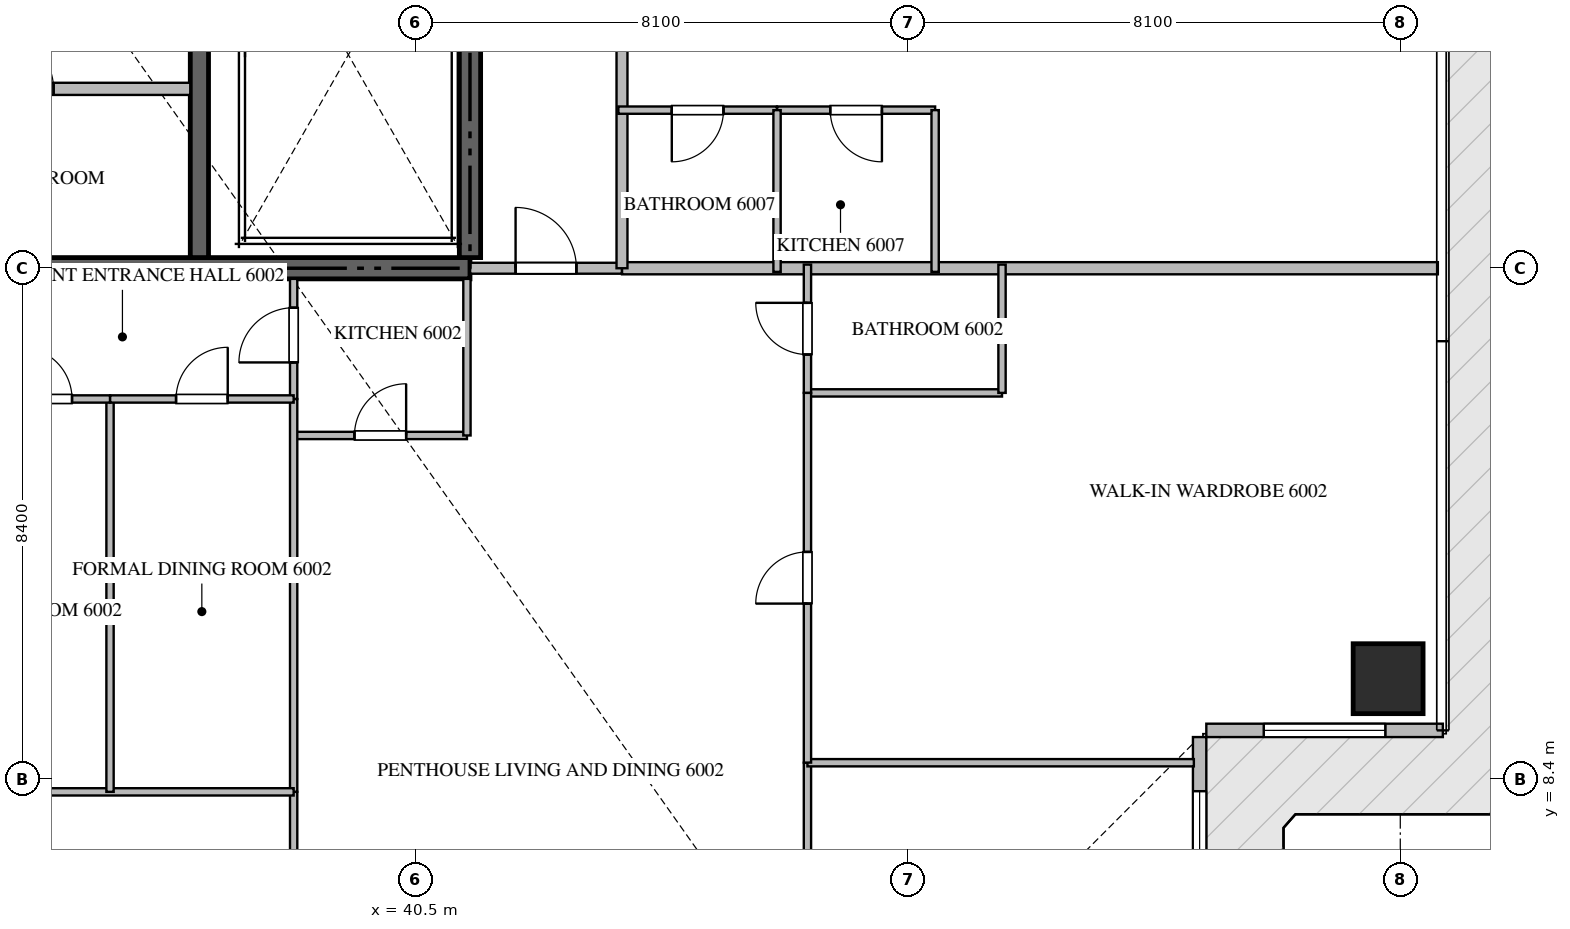
"""IFC4 building model, lengths in metres.
Left out: names, types, materials, properties, quantities, classifications, styles, units other than length and angle.
Written with IfcOpenShell. Run it as: python <this file> out.ifc"""

import sys

from ifc_helpers import new_model, si_unit, direction, frame, frame_2d, origin, origin_2d, place, context, subcontext, project, spatial, rectangle, extrude, source, transform, mapped, element, fill, save


model = new_model("IFC4")
c1 = context("Model", 3, precision=1e-05, world=origin(), true_north=direction((0.0, 1.0)))
c2 = subcontext(c1, "Body", "Model", "MODEL_VIEW")
j1 = project(units=[si_unit("LENGTHUNIT", "METRE"), si_unit("PLANEANGLEUNIT", "RADIAN")], contexts=[c1])
p1 = place(None, origin())
s1 = spatial("IfcSite", under=j1, at=p1, CompositionType="ELEMENT")
p2 = place(p1, origin())
s2 = spatial("IfcBuilding", under=s1, at=p2, CompositionType="ELEMENT")
p3 = place(p2, frame((0.0, 0.0, 241.25)))
s3 = spatial("IfcBuildingStorey", under=s2, at=p3, CompositionType="ELEMENT", Elevation=241.25)
p4 = place(p3, frame((23.4, 16.8, -0.26), z_axis=(0.0, 0.0, 1.0), x_axis=(1.0, 0.0, 0.0)))
e1 = element("IfcWall", 1, at=p4, inside=s3, PredefinedType="SHEAR", context=c2, shape_type="SweptSolid", body=[
    extrude(rectangle(XDim=18.0, YDim=0.35, at=frame_2d((9.0, 0.0))), origin(), (0.0, 0.0, 1.0), 3.848),
])
p5 = place(p3, frame((41.4, 16.975, -0.26), z_axis=(0.0, 0.0, 1.0), x_axis=(0.0, 1.0, 0.0)))
e2 = element("IfcWall", 2, at=p5, inside=s3, PredefinedType="SHEAR", context=c2, shape_type="SweptSolid", body=[
    extrude(rectangle(XDim=8.375, YDim=0.35, at=frame_2d((4.188, 0.0))), origin(), (0.0, 0.0, 1.0), 3.848),
])
p6 = place(p3, frame((36.95, 16.975, -0.26), z_axis=(0.0, 0.0, 1.0), x_axis=(0.0, 1.0, 0.0)))
e3 = element("IfcWall", 3, at=p6, inside=s3, PredefinedType="SHEAR", context=c2, shape_type="SweptSolid", body=[
    extrude(rectangle(XDim=8.375, YDim=0.3, at=frame_2d((4.188, 0.0))), origin(), (0.0, 0.0, 1.0), 3.848),
])
m1 = source(origin(), c2, "Body", "SweptSolid", [
    extrude(rectangle(XDim=1.15, YDim=1.15, at=origin_2d()), origin(), (0.0, 0.0, 1.0), 3.85),
])
p7 = place(p3, frame((56.5, 10.05, -0.26), z_axis=(0.0, 0.0, 1.0), x_axis=(1.0, 0.0, 0.0)))
e4 = element("IfcColumn", 4, at=p7, inside=s3, PredefinedType="COLUMN", context=c2, shape_type="MappedRepresentation", body=[
    mapped(m1, transform((0.0, 0.0, 0.0), scale=1.0)),
])
p8 = place(p3, frame((53.4, 5.31, 0.0), z_axis=(0.0, 0.0, 1.0), x_axis=(0.0, 1.0, 0.0)))
e5 = element("IfcWall", 5, at=p8, inside=s3, PredefinedType="ELEMENTEDWALL", context=c2, shape_type="SweptSolid", body=[
    extrude(rectangle(XDim=3.78, YDim=0.22, at=frame_2d((1.89, 0.0))), origin(), (0.0, 0.0, 1.0), 3.575),
])
p9 = place(p8, frame((0.89, 0.0, 0.65)))
e6 = element("IfcOpeningElement", 6, at=p9, cuts=e5, PredefinedType="OPENING", context=c2, shape_type="SweptSolid", body=[
    extrude(rectangle(XDim=2.0, YDim=2.2, at=frame_2d((1.0, 1.1))), frame((0.0, 0.12, 0.0), z_axis=(0.0, -1.0, 0.0), x_axis=(1.0, 0.0, 0.0)), (0.0, 0.0, 1.0), 0.24),
])
p10 = place(p3, frame((53.51, 9.2, 0.0), z_axis=(0.0, 0.0, 1.0), x_axis=(1.0, 0.0, 0.0)))
e7 = element("IfcWall", 7, at=p10, inside=s3, PredefinedType="ELEMENTEDWALL", context=c2, shape_type="SweptSolid", body=[
    extrude(rectangle(XDim=3.89, YDim=0.22, at=frame_2d((1.945, 0.0))), origin(), (0.0, 0.0, 1.0), 3.575),
])
p11 = place(p10, frame((0.945, 0.0, 0.65)))
e8 = element("IfcOpeningElement", 8, at=p11, cuts=e7, PredefinedType="OPENING", context=c2, shape_type="SweptSolid", body=[
    extrude(rectangle(XDim=2.0, YDim=2.2, at=frame_2d((1.0, 1.1))), frame((0.0, 0.12, 0.0), z_axis=(0.0, -1.0, 0.0), x_axis=(1.0, 0.0, 0.0)), (0.0, 0.0, 1.0), 0.24),
])
p12 = place(p3, frame((31.402, 19.75, 0.0), z_axis=(0.0, 0.0, 1.0), x_axis=(1.0, 0.0, 0.0)))
e9 = element("IfcWall", 9, at=p12, inside=s3, PredefinedType="STANDARD", context=c2, shape_type="SweptSolid", body=[
    extrude(rectangle(XDim=5.398, YDim=0.2, at=frame_2d((2.699, 0.0))), origin(), (0.0, 0.0, 1.0), 3.59),
])
p13 = place(p12, frame((2.249, 0.0, 0.0)))
e10 = element("IfcOpeningElement", 10, at=p13, cuts=e9, PredefinedType="OPENING", context=c2, shape_type="SweptSolid", body=[
    extrude(rectangle(XDim=0.9, YDim=2.1, at=frame_2d((0.45, 1.05))), frame((0.0, 0.11, 0.0), z_axis=(0.0, -1.0, 0.0), x_axis=(1.0, 0.0, 0.0)), (0.0, 0.0, 1.0), 0.22),
])
p14 = place(p3, frame((43.9, 16.8, 0.0), z_axis=(0.0, 0.0, 1.0), x_axis=(1.0, 0.0, 0.0)))
e11 = element("IfcWall", 11, at=p14, inside=s3, PredefinedType="PARTITIONING", context=c2, shape_type="SweptSolid", body=[
    extrude(rectangle(XDim=13.418, YDim=0.2, at=frame_2d((6.709, 0.0))), origin(), (0.0, 0.0, 1.0), 3.59),
])
p15 = place(p3, frame((41.402, 16.8, 0.0), z_axis=(0.0, 0.0, 1.0), x_axis=(1.0, 0.0, 0.0)))
e12 = element("IfcWall", 12, at=p15, inside=s3, PredefinedType="PARTITIONING", context=c2, shape_type="SweptSolid", body=[
    extrude(rectangle(XDim=2.496, YDim=0.18, at=frame_2d((1.248, 0.0))), origin(), (0.0, 0.0, 1.0), 3.59),
])
p16 = place(p15, frame((0.748, 0.0, 0.0)))
e13 = element("IfcOpeningElement", 13, at=p16, cuts=e12, PredefinedType="OPENING", context=c2, shape_type="SweptSolid", body=[
    extrude(rectangle(XDim=1.0, YDim=2.15, at=frame_2d((0.5, 1.075))), frame((0.0, 0.1, 0.0), z_axis=(0.0, -1.0, 0.0), x_axis=(1.0, 0.0, 0.0)), (0.0, 0.0, 1.0), 0.2),
])
p17 = place(p3, frame((43.9, 16.8, 0.0), z_axis=(0.0, 0.0, 1.0), x_axis=(0.0, 1.0, 0.0)))
e14 = element("IfcWall", 14, at=p17, inside=s3, PredefinedType="PARTITIONING", context=c2, shape_type="SweptSolid", body=[
    extrude(rectangle(XDim=16.8, YDim=0.18, at=frame_2d((8.4, 0.0))), origin(), (0.0, 0.0, 1.0), 3.59),
])
p18 = place(p17, frame((4.993, 0.0, 0.0)))
e15 = element("IfcOpeningElement", 15, at=p18, cuts=e14, PredefinedType="OPENING", context=c2, shape_type="SweptSolid", body=[
    extrude(rectangle(XDim=1.0, YDim=2.15, at=frame_2d((0.5, 1.075))), frame((0.0, 0.1, 0.0), z_axis=(0.0, -1.0, 0.0), x_axis=(1.0, 0.0, 0.0)), (0.0, 0.0, 1.0), 0.2),
])
p19 = place(p17, frame((13.351, 0.0, 0.0)))
e16 = element("IfcOpeningElement", 16, at=p19, cuts=e14, PredefinedType="OPENING", context=c2, shape_type="SweptSolid", body=[
    extrude(rectangle(XDim=1.0, YDim=2.15, at=frame_2d((0.5, 1.075))), frame((0.0, 0.1, 0.0), z_axis=(0.0, -1.0, 0.0), x_axis=(1.0, 0.0, 0.0)), (0.0, 0.0, 1.0), 0.2),
])
p20 = place(p3, frame((38.5, 14.05, 0.0), z_axis=(0.0, 0.0, 1.0), x_axis=(1.0, 0.0, 0.0)))
e17 = element("IfcWall", 17, at=p20, inside=s3, PredefinedType="PARTITIONING", context=c2, shape_type="SweptSolid", body=[
    extrude(rectangle(XDim=2.85, YDim=0.12, at=frame_2d((1.425, 0.0))), origin(), (0.0, 0.0, 1.0), 3.59),
])
p21 = place(p20, frame((1.0, 0.0, 0.0)))
e18 = element("IfcOpeningElement", 18, at=p21, cuts=e17, PredefinedType="OPENING", context=c2, shape_type="SweptSolid", body=[
    extrude(rectangle(XDim=0.85, YDim=2.1, at=frame_2d((0.425, 1.05))), frame((0.0, 0.07, 0.0), z_axis=(0.0, -1.0, 0.0), x_axis=(1.0, 0.0, 0.0)), (0.0, 0.0, 1.0), 0.14),
])
p22 = place(p3, frame((41.35, 14.05, 0.0), z_axis=(0.0, 0.0, 1.0), x_axis=(0.0, 1.0, 0.0)))
e19 = element("IfcWall", 19, at=p22, inside=s3, PredefinedType="PARTITIONING", context=c2, shape_type="SweptSolid", body=[
    extrude(rectangle(XDim=2.575, YDim=0.12, at=frame_2d((1.288, 0.0))), origin(), (0.0, 0.0, 1.0), 3.59),
])
p23 = place(p3, frame((38.5, 14.65, 0.0), z_axis=(0.0, 0.0, 1.0), x_axis=(0.0, 1.0, 0.0)))
e20 = element("IfcWall", 20, at=p23, inside=s3, PredefinedType="PARTITIONING", context=c2, shape_type="SweptSolid", body=[
    extrude(rectangle(XDim=1.975, YDim=0.12, at=frame_2d((0.988, 0.0))), origin(), (0.0, 0.0, 1.0), 3.59),
])
p24 = place(p23, frame((0.601, 0.0, 0.0)))
e21 = element("IfcOpeningElement", 21, at=p24, cuts=e20, PredefinedType="OPENING", context=c2, shape_type="SweptSolid", body=[
    extrude(rectangle(XDim=0.9, YDim=2.1, at=frame_2d((0.45, 1.05))), frame((0.0, 0.07, 0.0), z_axis=(0.0, -1.0, 0.0), x_axis=(1.0, 0.0, 0.0)), (0.0, 0.0, 1.0), 0.14),
])
p25 = place(p3, frame((38.5, 1.295, 0.0), z_axis=(0.0, 0.0, 1.0), x_axis=(0.0, 1.0, 0.0)))
e22 = element("IfcWall", 22, at=p25, inside=s3, PredefinedType="PARTITIONING", context=c2, shape_type="SweptSolid", body=[
    extrude(rectangle(XDim=6.894, YDim=0.12, at=frame_2d((3.447, 0.0))), origin(), (0.0, 0.0, 1.0), 3.59),
])
p26 = place(p25, frame((3.297, 0.0, 0.0)))
e23 = element("IfcOpeningElement", 23, at=p26, cuts=e22, PredefinedType="OPENING", context=c2, shape_type="SweptSolid", body=[
    extrude(rectangle(XDim=0.9, YDim=2.1, at=frame_2d((0.45, 1.05))), frame((0.0, 0.07, 0.0), z_axis=(0.0, -1.0, 0.0), x_axis=(1.0, 0.0, 0.0)), (0.0, 0.0, 1.0), 0.14),
])
p27 = place(p3, frame((38.5, 8.191, 0.0), z_axis=(0.0, 0.0, 1.0), x_axis=(0.0, 1.0, 0.0)))
e24 = element("IfcWall", 24, at=p27, inside=s3, PredefinedType="PARTITIONING", context=c2, shape_type="SweptSolid", body=[
    extrude(rectangle(XDim=6.457, YDim=0.12, at=frame_2d((3.229, 0.0))), origin(), (0.0, 0.0, 1.0), 3.59),
])
p28 = place(p3, frame((33.38, 8.189, 0.0), z_axis=(0.0, 0.0, 1.0), x_axis=(1.0, 0.0, 0.0)))
e25 = element("IfcWall", 25, at=p28, inside=s3, PredefinedType="PARTITIONING", context=c2, shape_type="SweptSolid", body=[
    extrude(rectangle(XDim=5.12, YDim=0.12, at=frame_2d((2.56, 0.0))), origin(), (0.0, 0.0, 1.0), 3.59),
])
p29 = place(p3, frame((35.48, 8.189, 0.0), z_axis=(0.0, 0.0, 1.0), x_axis=(0.0, 1.0, 0.0)))
e26 = element("IfcWall", 26, at=p29, inside=s3, PredefinedType="PARTITIONING", context=c2, shape_type="SweptSolid", body=[
    extrude(rectangle(XDim=6.461, YDim=0.12, at=frame_2d((3.23, 0.0))), origin(), (0.0, 0.0, 1.0), 3.59),
])
p30 = place(p3, frame((33.38, 14.65, 0.0), z_axis=(0.0, 0.0, 1.0), x_axis=(1.0, 0.0, 0.0)))
e27 = element("IfcWall", 27, at=p30, inside=s3, PredefinedType="PARTITIONING", context=c2, shape_type="SweptSolid", body=[
    extrude(rectangle(XDim=2.1, YDim=0.12, at=frame_2d((1.05, 0.0))), origin(), (0.0, 0.0, 1.0), 3.59),
])
p31 = place(p30, frame((0.625, 0.0, 0.0)))
e28 = element("IfcOpeningElement", 28, at=p31, cuts=e27, PredefinedType="OPENING", context=c2, shape_type="SweptSolid", body=[
    extrude(rectangle(XDim=0.85, YDim=2.1, at=frame_2d((0.425, 1.05))), frame((0.0, 0.07, 0.0), z_axis=(0.0, -1.0, 0.0), x_axis=(1.0, 0.0, 0.0)), (0.0, 0.0, 1.0), 0.14),
])
p32 = place(p3, frame((35.482, 14.65, 0.0), z_axis=(0.0, 0.0, 1.0), x_axis=(1.0, 0.0, 0.0)))
e29 = element("IfcWall", 29, at=p32, inside=s3, PredefinedType="PARTITIONING", context=c2, shape_type="SweptSolid", body=[
    extrude(rectangle(XDim=3.018, YDim=0.12, at=frame_2d((1.509, 0.0))), origin(), (0.0, 0.0, 1.0), 3.59),
])
p33 = place(p32, frame((1.084, 0.0, 0.0)))
e30 = element("IfcOpeningElement", 30, at=p33, cuts=e29, PredefinedType="OPENING", context=c2, shape_type="SweptSolid", body=[
    extrude(rectangle(XDim=0.85, YDim=2.1, at=frame_2d((0.425, 1.05))), frame((0.0, 0.07, 0.0), z_axis=(0.0, -1.0, 0.0), x_axis=(1.0, 0.0, 0.0)), (0.0, 0.0, 1.0), 0.14),
])
p34 = place(p3, frame((46.95, 1.295, 0.0), z_axis=(0.0, 0.0, 1.0), x_axis=(0.0, 1.0, 0.0)))
e31 = element("IfcWall", 31, at=p34, inside=s3, PredefinedType="PARTITIONING", context=c2, shape_type="SweptSolid", body=[
    extrude(rectangle(XDim=7.373, YDim=0.12, at=frame_2d((3.687, 0.0))), origin(), (0.0, 0.0, 1.0), 3.59),
])
p35 = place(p34, frame((3.56, 0.0, 0.0)))
e32 = element("IfcOpeningElement", 32, at=p35, cuts=e31, PredefinedType="OPENING", context=c2, shape_type="SweptSolid", body=[
    extrude(rectangle(XDim=0.9, YDim=2.1, at=frame_2d((0.45, 1.05))), frame((0.0, 0.07, 0.0), z_axis=(0.0, -1.0, 0.0), x_axis=(1.0, 0.0, 0.0)), (0.0, 0.0, 1.0), 0.14),
])
p36 = place(p3, frame((46.95, 8.668, 0.0), z_axis=(0.0, 0.0, 1.0), x_axis=(1.0, 0.0, 0.0)))
e33 = element("IfcWall", 33, at=p36, inside=s3, PredefinedType="PARTITIONING", context=c2, shape_type="SweptSolid", body=[
    extrude(rectangle(XDim=6.355, YDim=0.12, at=frame_2d((3.177, 0.0))), origin(), (0.0, 0.0, 1.0), 3.59),
])
p37 = place(p3, frame((46.95, 14.75, 0.0), z_axis=(0.0, 0.0, 1.0), x_axis=(1.0, 0.0, 0.0)))
e34 = element("IfcWall", 34, at=p37, inside=s3, PredefinedType="PARTITIONING", context=c2, shape_type="SweptSolid", body=[
    extrude(rectangle(XDim=3.2, YDim=0.12, at=frame_2d((1.6, 0.0))), origin(), (0.0, 0.0, 1.0), 3.59),
])
p38 = place(p3, frame((50.15, 14.75, 0.0), z_axis=(0.0, 0.0, 1.0), x_axis=(0.0, 1.0, 0.0)))
e35 = element("IfcWall", 35, at=p38, inside=s3, PredefinedType="PARTITIONING", context=c2, shape_type="SweptSolid", body=[
    extrude(rectangle(XDim=2.11, YDim=0.12, at=frame_2d((1.055, 0.0))), origin(), (0.0, 0.0, 1.0), 3.59),
])
p39 = place(p3, frame((46.95, 8.67, 0.0), z_axis=(0.0, 0.0, 1.0), x_axis=(0.0, 1.0, 0.0)))
e36 = element("IfcWall", 36, at=p39, inside=s3, PredefinedType="PARTITIONING", context=c2, shape_type="SweptSolid", body=[
    extrude(rectangle(XDim=6.08, YDim=0.12, at=frame_2d((3.04, 0.0))), origin(), (0.0, 0.0, 1.0), 3.59),
])
p40 = place(p39, frame((2.615, 0.0, 0.0)))
e37 = element("IfcOpeningElement", 37, at=p40, cuts=e36, PredefinedType="OPENING", context=c2, shape_type="SweptSolid", body=[
    extrude(rectangle(XDim=0.85, YDim=2.1, at=frame_2d((0.425, 1.05))), frame((0.0, 0.07, 0.0), z_axis=(0.0, -1.0, 0.0), x_axis=(1.0, 0.0, 0.0)), (0.0, 0.0, 1.0), 0.14),
])
p41 = place(p3, frame((46.95, 14.752, 0.0), z_axis=(0.0, 0.0, 1.0), x_axis=(0.0, 1.0, 0.0)))
e38 = element("IfcWall", 38, at=p41, inside=s3, PredefinedType="PARTITIONING", context=c2, shape_type="SweptSolid", body=[
    extrude(rectangle(XDim=2.108, YDim=0.12, at=frame_2d((1.054, 0.0))), origin(), (0.0, 0.0, 1.0), 3.59),
])
p42 = place(p41, frame((0.629, 0.0, 0.0)))
e39 = element("IfcOpeningElement", 39, at=p42, cuts=e38, PredefinedType="OPENING", context=c2, shape_type="SweptSolid", body=[
    extrude(rectangle(XDim=0.85, YDim=2.1, at=frame_2d((0.425, 1.05))), frame((0.0, 0.07, 0.0), z_axis=(0.0, -1.0, 0.0), x_axis=(1.0, 0.0, 0.0)), (0.0, 0.0, 1.0), 0.14),
])
p43 = place(p3, frame((49.05, 19.4, 0.0), z_axis=(0.0, 0.0, 1.0), x_axis=(-1.0, 0.0, 0.0)))
e40 = element("IfcWall", 40, at=p43, inside=s3, PredefinedType="PARTITIONING", context=c2, shape_type="SweptSolid", body=[
    extrude(rectangle(XDim=2.6, YDim=0.12, at=frame_2d((1.3, 0.0))), origin(), (0.0, 0.0, 1.0), 3.59),
])
p44 = place(p43, frame((0.875, 0.0, 0.0)))
e41 = element("IfcOpeningElement", 41, at=p44, cuts=e40, PredefinedType="OPENING", context=c2, shape_type="SweptSolid", body=[
    extrude(rectangle(XDim=0.85, YDim=2.1, at=frame_2d((0.425, 1.05))), frame((0.0, 0.07, 0.0), z_axis=(0.0, -1.0, 0.0), x_axis=(1.0, 0.0, 0.0)), (0.0, 0.0, 1.0), 0.14),
])
p45 = place(p3, frame((46.448, 19.4, 0.0), z_axis=(0.0, 0.0, 1.0), x_axis=(-1.0, 0.0, 0.0)))
e42 = element("IfcWall", 42, at=p45, inside=s3, PredefinedType="PARTITIONING", context=c2, shape_type="SweptSolid", body=[
    extrude(rectangle(XDim=2.608, YDim=0.12, at=frame_2d((1.304, 0.0))), origin(), (0.0, 0.0, 1.0), 3.59),
])
p46 = place(p45, frame((0.879, 0.0, 0.0)))
e43 = element("IfcOpeningElement", 43, at=p46, cuts=e42, PredefinedType="OPENING", context=c2, shape_type="SweptSolid", body=[
    extrude(rectangle(XDim=0.85, YDim=2.1, at=frame_2d((0.425, 1.05))), frame((0.0, 0.07, 0.0), z_axis=(0.0, -1.0, 0.0), x_axis=(1.0, 0.0, 0.0)), (0.0, 0.0, 1.0), 0.14),
])
for number, where, z_axis, x_axis in (
    (44, (46.45, 16.74, 0.0), (0.0, 0.0, 1.0), (0.0, 1.0, 0.0)),
    (45, (49.05, 16.74, 0.0), (0.0, 0.0, 1.0), (0.0, 1.0, 0.0)),
):
    element("IfcWall", number, at=place(p3, frame(where, z_axis=z_axis, x_axis=x_axis)), inside=s3, PredefinedType="PARTITIONING", context=c2, shape_type="SweptSolid", body=[
        extrude(rectangle(XDim=2.66, YDim=0.12, at=frame_2d((1.33, 0.0))), origin(), (0.0, 0.0, 1.0), 3.59),
    ])
m2 = source(origin(), c2, "Body", "SweptSolid", [
    extrude(rectangle(XDim=2.0, YDim=2.2, at=frame_2d((1.0, 1.1))), frame((0.0, 0.03, 0.0), z_axis=(0.0, -1.0, 0.0), x_axis=(1.0, 0.0, 0.0)), (0.0, 0.0, 1.0), 0.06),
])
p47 = place(p9, origin())
e46 = element("IfcWindow", 46, at=p47, inside=s3, PartitioningType="SINGLE_PANEL", PredefinedType="WINDOW", context=c2, shape_type="MappedRepresentation", body=[
    mapped(m2, transform((0.0, 0.0, 0.0), scale=1.0)),
])
fill(e6, e46)
p48 = place(p11, origin())
e47 = element("IfcWindow", 47, at=p48, inside=s3, PartitioningType="SINGLE_PANEL", PredefinedType="WINDOW", context=c2, shape_type="MappedRepresentation", body=[
    mapped(m2, transform((0.0, 0.0, 0.0), scale=1.0)),
])
fill(e8, e47)
m3 = source(origin(), c2, "Body", "SweptSolid", [
    extrude(rectangle(XDim=0.9, YDim=2.1, at=frame_2d((0.45, 1.05))), frame((0.0, 0.025, 0.0), z_axis=(0.0, -1.0, 0.0), x_axis=(1.0, 0.0, 0.0)), (0.0, 0.0, 1.0), 0.05),
])
p49 = place(p13, origin())
e48 = element("IfcDoor", 48, at=p49, inside=s3, OperationType="SINGLE_SWING_LEFT", PredefinedType="DOOR", context=c2, shape_type="MappedRepresentation", body=[
    mapped(m3, transform((0.0, 0.0, 0.0), scale=1.0)),
])
fill(e10, e48)
m4 = source(origin(), c2, "Body", "SweptSolid", [
    extrude(rectangle(XDim=1.0, YDim=2.15, at=frame_2d((0.5, 1.075))), frame((0.0, 0.025, 0.0), z_axis=(0.0, -1.0, 0.0), x_axis=(1.0, 0.0, 0.0)), (0.0, 0.0, 1.0), 0.05),
])
p50 = place(p16, origin())
e49 = element("IfcDoor", 49, at=p50, inside=s3, OperationType="SINGLE_SWING_LEFT", PredefinedType="DOOR", context=c2, shape_type="MappedRepresentation", body=[
    mapped(m4, transform((0.0, 0.0, 0.0), scale=1.0)),
])
fill(e13, e49)
m5 = source(origin(), c2, "Body", "SweptSolid", [
    extrude(rectangle(XDim=0.85, YDim=2.1, at=frame_2d((0.425, 1.05))), frame((0.0, 0.025, 0.0), z_axis=(0.0, -1.0, 0.0), x_axis=(1.0, 0.0, 0.0)), (0.0, 0.0, 1.0), 0.05),
])
p51 = place(p21, origin())
e50 = element("IfcDoor", 50, at=p51, inside=s3, OperationType="SINGLE_SWING_RIGHT", PredefinedType="DOOR", context=c2, shape_type="MappedRepresentation", body=[
    mapped(m5, transform((0.0, 0.0, 0.0), scale=1.0)),
])
fill(e18, e50)
p52 = place(p24, origin())
e51 = element("IfcDoor", 51, at=p52, inside=s3, OperationType="SINGLE_SWING_LEFT", PredefinedType="DOOR", context=c2, shape_type="MappedRepresentation", body=[
    mapped(m3, transform((0.0, 0.0, 0.0), scale=1.0)),
])
fill(e21, e51)
p53 = place(p31, origin())
e52 = element("IfcDoor", 52, at=p53, inside=s3, OperationType="SINGLE_SWING_LEFT", PredefinedType="DOOR", context=c2, shape_type="MappedRepresentation", body=[
    mapped(m5, transform((0.0, 0.0, 0.0), scale=1.0)),
])
fill(e28, e52)
p54 = place(p33, origin())
e53 = element("IfcDoor", 53, at=p54, inside=s3, OperationType="SINGLE_SWING_RIGHT", PredefinedType="DOOR", context=c2, shape_type="MappedRepresentation", body=[
    mapped(m5, transform((0.0, 0.0, 0.0), scale=1.0)),
])
fill(e30, e53)
p55 = place(p40, origin())
e54 = element("IfcDoor", 54, at=p55, inside=s3, OperationType="SINGLE_SWING_LEFT", PredefinedType="DOOR", context=c2, shape_type="MappedRepresentation", body=[
    mapped(m5, transform((0.0, 0.0, 0.0), scale=1.0)),
])
fill(e37, e54)
p56 = place(p42, origin())
e55 = element("IfcDoor", 55, at=p56, inside=s3, OperationType="SINGLE_SWING_RIGHT", PredefinedType="DOOR", context=c2, shape_type="MappedRepresentation", body=[
    mapped(m5, transform((0.0, 0.0, 0.0), scale=1.0)),
])
fill(e39, e55)
p57 = place(p44, origin())
e56 = element("IfcDoor", 56, at=p57, inside=s3, OperationType="SINGLE_SWING_LEFT", PredefinedType="DOOR", context=c2, shape_type="MappedRepresentation", body=[
    mapped(m5, transform((0.0, 0.0, 0.0), scale=1.0)),
])
fill(e41, e56)
p58 = place(p46, origin())
e57 = element("IfcDoor", 57, at=p58, inside=s3, OperationType="SINGLE_SWING_RIGHT", PredefinedType="DOOR", context=c2, shape_type="MappedRepresentation", body=[
    mapped(m5, transform((0.0, 0.0, 0.0), scale=1.0)),
])
fill(e43, e57)
save(model, sys.argv[1])
